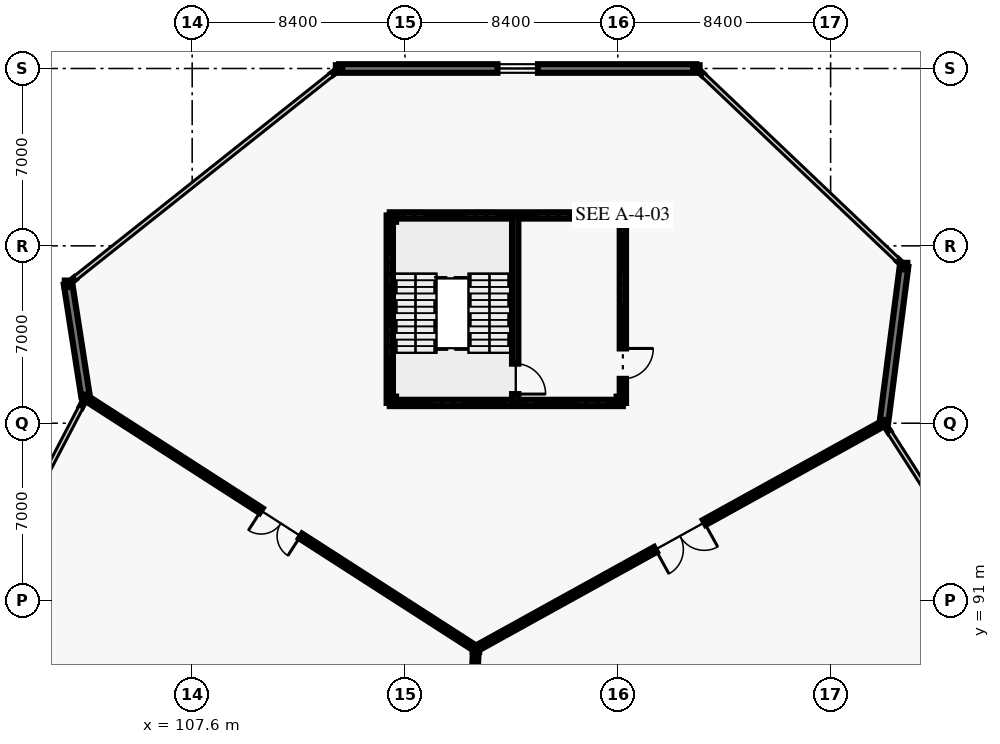
"""IFC4 building model, lengths in metres.
Left out: names, types, materials, properties, quantities, classifications, styles, units other than length and angle.
Written with IfcOpenShell. Run it as: python <this file> out.ifc"""

import sys

from ifc_helpers import new_model, si_unit, direction, frame, frame_2d, origin, origin_2d, place, context, subcontext, project, spatial, rectangle, i_section, extrude, element, fill, save


model = new_model("IFC4")
c1 = context("Model", 3, precision=1e-05, world=origin(), true_north=direction((0.0, 1.0)))
c2 = subcontext(c1, "Body", "Model", "MODEL_VIEW")
j1 = project(units=[si_unit("LENGTHUNIT", "METRE"), si_unit("PLANEANGLEUNIT", "RADIAN")], contexts=[c1])
p1 = place(None, origin())
s1 = spatial("IfcSite", under=j1, at=p1, CompositionType="ELEMENT")
p2 = place(p1, origin())
s2 = spatial("IfcBuilding", under=s1, at=p2, CompositionType="ELEMENT")
p3 = place(p2, frame((0.0, 0.0, 19.8)))
s3 = spatial("IfcBuildingStorey", under=s2, at=p3, CompositionType="ELEMENT", Elevation=19.8)
for number, where, z_axis, x_axis in (
    (1, (102.7, 103.5, 0.0), (0.0, 0.0, 1.0), (1.0, 0.0, 0.0)),
    (2, (103.4, 99.0, 0.0), (0.0, 0.0, 1.0), (1.0, 0.0, 0.0)),
    (3, (113.4, 112.0, 0.0), (0.0, 0.0, 1.0), (1.0, 0.0, 0.0)),
    (4, (118.8, 89.1, 0.0), (0.0, 0.0, 1.0), (1.0, 0.0, 0.0)),
    (5, (127.5, 112.0, 0.0), (0.0, 0.0, 1.0), (1.0, 0.0, 0.0)),
    (6, (134.9, 98.0, 0.0), (0.0, 0.0, 1.0), (1.0, 0.0, 0.0)),
    (7, (135.7, 104.2, 0.0), (0.0, 0.0, 1.0), (1.0, 0.0, 0.0)),
    (8, (115.52, 98.92, 0.0), (0.0, 0.0, 1.0), (1.0, 0.0, 0.0)),
    (9, (124.48, 98.92, 0.0), (0.0, 0.0, 1.0), (1.0, 0.0, 0.0)),
    (10, (124.48, 106.08, 0.0), (0.0, 0.0, 1.0), (1.0, 0.0, 0.0)),
    (11, (115.52, 106.08, 0.0), (0.0, 0.0, 1.0), (1.0, 0.0, 0.0)),
):
    element("IfcColumn", number, at=place(p3, frame(where, z_axis=z_axis, x_axis=x_axis)), inside=s3, PredefinedType="COLUMN", context=c2, shape_type="SweptSolid", body=[
        extrude(i_section(OverallWidth=0.256, OverallDepth=0.26, WebThickness=0.01, FlangeThickness=0.017, FilletRadius=0.013, at=origin_2d()), origin(), (0.0, 0.0, 1.0), 9.0),
    ])
p4 = place(p3, frame((103.21, 98.637, 0.0), z_axis=(0.0, 0.0, 1.0), x_axis=(0.464243799771, 0.885707454171, 0.0)))
e12 = element("IfcWall", 12, at=p4, inside=s3, PredefinedType="SOLIDWALL", context=c2, shape_type="SweptSolid", body=[
    extrude(rectangle(XDim=0.308, YDim=0.095, at=frame_2d((0.154, 0.0))), origin(), (0.0, 0.0, 1.0), 7.82),
])
p5 = place(p3, frame((134.955, 97.915, 0.0), z_axis=(0.0, 0.0, 1.0), x_axis=(0.538155087301, -0.842845835258, 0.0)))
e13 = element("IfcWall", 13, at=p5, inside=s3, PredefinedType="SOLIDWALL", context=c2, shape_type="SweptSolid", body=[
    extrude(rectangle(XDim=0.309, YDim=0.095, at=frame_2d((0.154, 0.0))), origin(), (0.0, 0.0, 1.0), 7.82),
])
p6 = place(p3, frame((135.7, 104.2, 0.0), z_axis=(0.0, 0.0, 1.0), x_axis=(-0.127911284164, -0.99178561362, 0.0)))
e14 = element("IfcWall", 14, at=p6, inside=s3, PredefinedType="SOLIDWALL", context=c2, shape_type="SweptSolid", body=[
    extrude(rectangle(XDim=6.192, YDim=0.34, at=frame_2d((3.096, 0.0))), origin(), (0.0, 0.0, 1.0), 7.82),
])
for number, where, z_axis, x_axis in (
    (15, (127.53, 111.971, 0.0), (0.0, 0.0, 1.0), (0.726, -0.687, 0.0)),
    (16, (135.446, 104.441, 0.0), (0.0, 0.0, 1.0), (0.726, -0.687, 0.0)),
):
    element("IfcWall", number, at=place(p3, frame(where, z_axis=z_axis, x_axis=x_axis)), inside=s3, PredefinedType="SOLIDWALL", context=c2, shape_type="SweptSolid", body=[
        extrude(rectangle(XDim=0.308, YDim=0.095, at=frame_2d((0.154, 0.0))), origin(), (0.0, 0.0, 1.0), 7.82),
    ])
p7 = place(p3, frame((113.4, 112.0, 0.0), z_axis=(0.0, 0.0, 1.0), x_axis=(1.0, 0.0, 0.0)))
e17 = element("IfcWall", 17, at=p7, inside=s3, PredefinedType="SOLIDWALL", context=c2, shape_type="SweptSolid", body=[
    extrude(rectangle(XDim=14.1, YDim=0.34, at=frame_2d((7.05, 0.0))), origin(), (0.0, 0.0, 1.0), 7.82),
])
p8 = place(p7, frame((6.25, 0.0, 0.95)))
e18 = element("IfcOpeningElement", 18, at=p8, cuts=e17, PredefinedType="OPENING", context=c2, shape_type="SweptSolid", body=[
    extrude(rectangle(XDim=1.6, YDim=2.4, at=frame_2d((0.8, 1.2))), frame((0.0, 0.18, 0.0), z_axis=(0.0, -1.0, 0.0), x_axis=(1.0, 0.0, 0.0)), (0.0, 0.0, 1.0), 0.36),
])
p9 = place(p3, frame((102.733, 103.526, 0.0), z_axis=(0.0, 0.0, 1.0), x_axis=(0.782180115256, 0.623052379257, 0.0)))
e19 = element("IfcWall", 19, at=p9, inside=s3, PredefinedType="SOLIDWALL", context=c2, shape_type="SweptSolid", body=[
    extrude(rectangle(XDim=0.308, YDim=0.095, at=frame_2d((0.154, 0.0))), origin(), (0.0, 0.0, 1.0), 7.82),
])
p10 = place(p3, frame((113.126, 111.782, 0.0), z_axis=(0.0, 0.0, 1.0), x_axis=(0.781872503851, 0.6234383592, 0.0)))
e20 = element("IfcWall", 20, at=p10, inside=s3, PredefinedType="SOLIDWALL", context=c2, shape_type="SweptSolid", body=[
    extrude(rectangle(XDim=0.308, YDim=0.095, at=frame_2d((0.154, 0.0))), origin(), (0.0, 0.0, 1.0), 7.82),
])
p11 = place(p3, frame((103.391, 99.059, 0.0), z_axis=(0.0, 0.0, 1.0), x_axis=(-0.153783616147, 0.988104548823, 0.0)))
e21 = element("IfcWall", 21, at=p11, inside=s3, PredefinedType="SOLIDWALL", context=c2, shape_type="SweptSolid", body=[
    extrude(rectangle(XDim=4.494, YDim=0.34, at=frame_2d((2.247, 0.0))), origin(), (0.0, 0.0, 1.0), 7.82),
])
p12 = place(p3, frame((117.9, 70.6, 0.0), z_axis=(0.0, 0.0, 1.0), x_axis=(0.048599072515, 0.998818366947, 0.0)))
e22 = element("IfcWall", 22, at=p12, inside=s3, PredefinedType="SOLIDWALL", context=c2, shape_type="SweptSolid", body=[
    extrude(rectangle(XDim=18.522, YDim=0.225, at=frame_2d((9.261, 0.0))), origin(), (0.0, 0.0, 1.0), 8.22),
])
p13 = place(p12, frame((8.261, 0.0, 0.0)))
e23 = element("IfcOpeningElement", 23, at=p13, cuts=e22, PredefinedType="OPENING", context=c2, shape_type="SweptSolid", body=[
    extrude(rectangle(XDim=2.0, YDim=2.5, at=frame_2d((1.0, 1.25))), frame((0.0, 0.123, 0.0), z_axis=(0.0, -1.0, 0.0), x_axis=(1.0, 0.0, 0.0)), (0.0, 0.0, 1.0), 0.245),
])
p14 = place(p3, frame((118.8, 89.1, 0.0), z_axis=(0.0, 0.0, 1.0), x_axis=(-0.841183241423, 0.540750177392, 0.0)))
e24 = element("IfcWall", 24, at=p14, inside=s3, PredefinedType="SOLIDWALL", context=c2, shape_type="SweptSolid", body=[
    extrude(rectangle(XDim=18.308, YDim=0.225, at=frame_2d((9.154, 0.0))), origin(), (0.0, 0.0, 1.0), 8.22),
])
p15 = place(p14, frame((8.229, 0.0, 0.0)))
e25 = element("IfcOpeningElement", 25, at=p15, cuts=e24, PredefinedType="OPENING", context=c2, shape_type="SweptSolid", body=[
    extrude(rectangle(XDim=1.85, YDim=2.4, at=frame_2d((0.925, 1.2))), frame((0.0, 0.123, 0.0), z_axis=(0.0, -1.0, 0.0), x_axis=(1.0, 0.0, 0.0)), (0.0, 0.0, 1.0), 0.245),
])
p16 = place(p3, frame((134.9, 98.0, 0.0), z_axis=(0.0, 0.0, 1.0), x_axis=(-0.875181353329, -0.483794996652, 0.0)))
e26 = element("IfcWall", 26, at=p16, inside=s3, PredefinedType="SOLIDWALL", context=c2, shape_type="SweptSolid", body=[
    extrude(rectangle(XDim=18.396, YDim=0.225, at=frame_2d((9.198, 0.0))), origin(), (0.0, 0.0, 1.0), 8.22),
])
p17 = place(p16, frame((8.098, 0.0, 0.0)))
e27 = element("IfcOpeningElement", 27, at=p17, cuts=e26, PredefinedType="OPENING", context=c2, shape_type="SweptSolid", body=[
    extrude(rectangle(XDim=2.2, YDim=2.6, at=frame_2d((1.1, 1.3))), frame((0.0, 0.123, 0.0), z_axis=(0.0, -1.0, 0.0), x_axis=(1.0, 0.0, 0.0)), (0.0, 0.0, 1.0), 0.245),
])
p18 = place(p3, frame((115.4, 98.8, 0.0), z_axis=(0.0, 0.0, 1.0), x_axis=(0.0, 1.0, 0.0)))
e28 = element("IfcWall", 28, at=p18, inside=s3, PredefinedType="SHEAR", context=c2, shape_type="SweptSolid", body=[
    extrude(rectangle(XDim=7.4, YDim=0.25, at=frame_2d((3.7, 0.0))), origin(), (0.0, 0.0, 1.0), 8.76),
])
for number, where, z_axis, x_axis in (
    (29, (115.4, 106.2, 0.0), (0.0, 0.0, 1.0), (1.0, 0.0, 0.0)),
    (30, (124.6, 98.8, 0.0), (0.0, 0.0, 1.0), (-1.0, 0.0, 0.0)),
):
    element("IfcWall", number, at=place(p3, frame(where, z_axis=z_axis, x_axis=x_axis)), inside=s3, PredefinedType="SHEAR", context=c2, shape_type="SweptSolid", body=[
        extrude(rectangle(XDim=9.2, YDim=0.25, at=frame_2d((4.6, 0.0))), origin(), (0.0, 0.0, 1.0), 8.76),
    ])
p19 = place(p3, frame((124.6, 106.2, 0.0), z_axis=(0.0, 0.0, 1.0), x_axis=(0.0, -1.0, 0.0)))
e31 = element("IfcWall", 31, at=p19, inside=s3, PredefinedType="SHEAR", context=c2, shape_type="SweptSolid", body=[
    extrude(rectangle(XDim=7.4, YDim=0.25, at=frame_2d((3.7, 0.0))), origin(), (0.0, 0.0, 1.0), 8.76),
])
p20 = place(p19, frame((5.25, 0.0, 0.0)))
e32 = element("IfcOpeningElement", 32, at=p20, cuts=e31, PredefinedType="OPENING", context=c2, shape_type="SweptSolid", body=[
    extrude(rectangle(XDim=1.2, YDim=2.2, at=frame_2d((0.6, 1.1))), frame((0.0, 0.135, 0.0), z_axis=(0.0, -1.0, 0.0), x_axis=(1.0, 0.0, 0.0)), (0.0, 0.0, 1.0), 0.27),
])
p21 = place(p3, frame((120.35, 106.2, 0.0), z_axis=(0.0, 0.0, 1.0), x_axis=(0.0, -1.0, 0.0)))
e33 = element("IfcWall", 33, at=p21, inside=s3, PredefinedType="SHEAR", context=c2, shape_type="SweptSolid", body=[
    extrude(rectangle(XDim=7.4, YDim=0.25, at=frame_2d((3.7, 0.0))), origin(), (0.0, 0.0, 1.0), 8.76),
])
p22 = place(p21, frame((5.85, 0.0, 0.0)))
e34 = element("IfcOpeningElement", 34, at=p22, cuts=e33, PredefinedType="OPENING", context=c2, shape_type="SweptSolid", body=[
    extrude(rectangle(XDim=1.2, YDim=2.2, at=frame_2d((0.6, 1.1))), frame((0.0, 0.135, 0.0), z_axis=(0.0, -1.0, 0.0), x_axis=(1.0, 0.0, 0.0)), (0.0, 0.0, 1.0), 0.27),
])
p23 = place(p8, origin())
e35 = element("IfcWindow", 35, at=p23, inside=s3, PartitioningType="SINGLE_PANEL", PredefinedType="WINDOW", context=c2, shape_type="SweptSolid", body=[
    extrude(rectangle(XDim=1.6, YDim=2.4, at=frame_2d((0.8, 1.2))), frame((0.0, 0.03, 0.0), z_axis=(0.0, -1.0, 0.0), x_axis=(1.0, 0.0, 0.0)), (0.0, 0.0, 1.0), 0.06),
])
fill(e18, e35)
p24 = place(p15, origin())
e36 = element("IfcDoor", 36, at=p24, inside=s3, OperationType="DOUBLE_DOOR_SINGLE_SWING", PredefinedType="DOOR", context=c2, shape_type="SweptSolid", body=[
    extrude(rectangle(XDim=1.85, YDim=2.4, at=frame_2d((0.925, 1.2))), frame((0.0, 0.025, 0.0), z_axis=(0.0, -1.0, 0.0), x_axis=(1.0, 0.0, 0.0)), (0.0, 0.0, 1.0), 0.05),
])
fill(e25, e36)
p25 = place(p17, origin())
e37 = element("IfcDoor", 37, at=p25, inside=s3, OperationType="DOUBLE_DOOR_SINGLE_SWING", PredefinedType="DOOR", context=c2, shape_type="SweptSolid", body=[
    extrude(rectangle(XDim=2.2, YDim=2.6, at=frame_2d((1.1, 1.3))), frame((0.0, 0.025, 0.0), z_axis=(0.0, -1.0, 0.0), x_axis=(1.0, 0.0, 0.0)), (0.0, 0.0, 1.0), 0.05),
])
fill(e27, e37)
p26 = place(p20, origin())
e38 = element("IfcDoor", 38, at=p26, inside=s3, OperationType="SINGLE_SWING_LEFT", PredefinedType="DOOR", context=c2, shape_type="SweptSolid", body=[
    extrude(rectangle(XDim=1.2, YDim=2.2, at=frame_2d((0.6, 1.1))), frame((0.0, 0.025, 0.0), z_axis=(0.0, -1.0, 0.0), x_axis=(1.0, 0.0, 0.0)), (0.0, 0.0, 1.0), 0.05),
])
fill(e32, e38)
p27 = place(p22, origin())
e39 = element("IfcDoor", 39, at=p27, inside=s3, OperationType="SINGLE_SWING_RIGHT", PredefinedType="DOOR", context=c2, shape_type="SweptSolid", body=[
    extrude(rectangle(XDim=1.2, YDim=2.2, at=frame_2d((0.6, 1.1))), frame((0.0, 0.025, 0.0), z_axis=(0.0, -1.0, 0.0), x_axis=(1.0, 0.0, 0.0)), (0.0, 0.0, 1.0), 0.05),
])
fill(e34, e39)
save(model, sys.argv[1])
